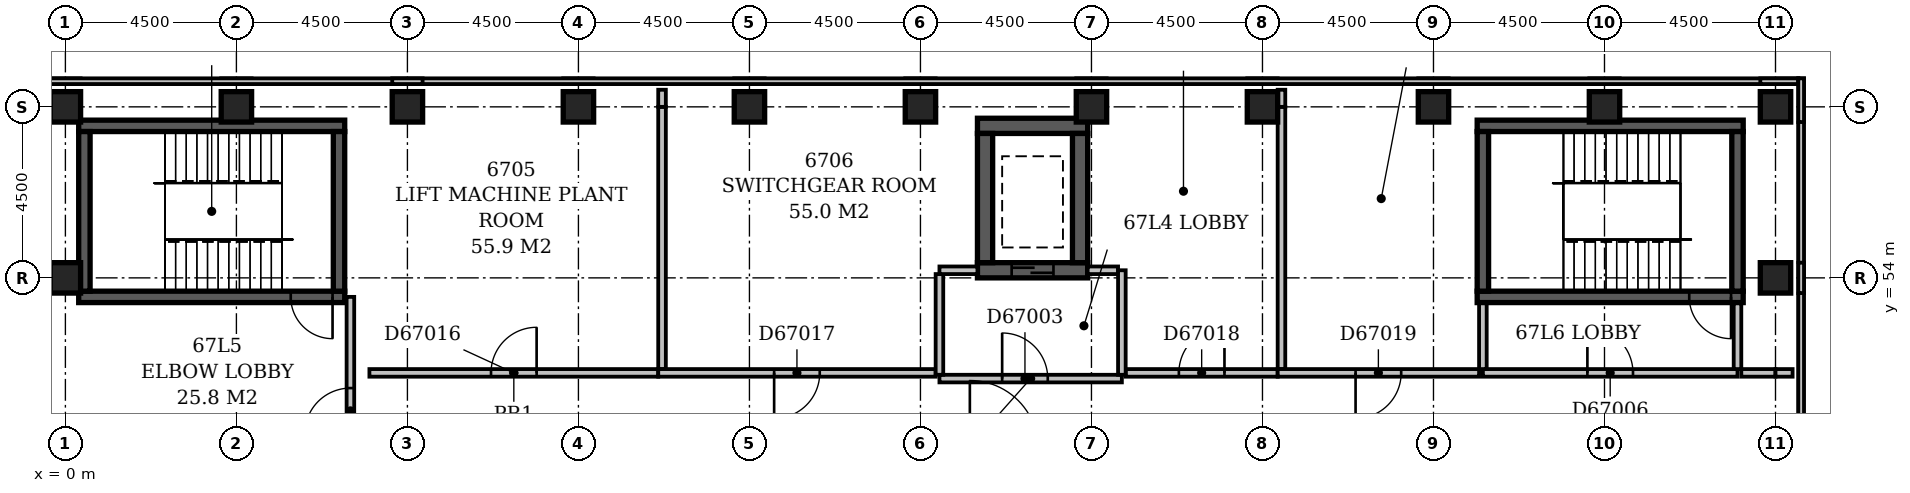
"""IFC4 building model, lengths in metres.
Left out: names, types, materials, properties, quantities, classifications, styles, units other than length and angle.
Written with IfcOpenShell. Run it as: python <this file> out.ifc"""

import sys

from ifc_helpers import new_model, si_unit, direction, frame, frame_2d, origin, origin_2d, place, context, subcontext, project, spatial, rectangle, extrude, element, fill, save


model = new_model("IFC4")
c1 = context("Model", 3, precision=1e-05, world=origin(), true_north=direction((0.0, 1.0)))
c2 = subcontext(c1, "Body", "Model", "MODEL_VIEW")
j1 = project(units=[si_unit("LENGTHUNIT", "METRE"), si_unit("PLANEANGLEUNIT", "RADIAN")], contexts=[c1])
p1 = place(None, origin())
s1 = spatial("IfcSite", under=j1, at=p1, CompositionType="ELEMENT")
p2 = place(p1, origin())
s2 = spatial("IfcBuilding", under=s1, at=p2, CompositionType="ELEMENT")
p3 = place(p2, frame((0.0, 0.0, 258.2)))
s3 = spatial("IfcBuildingStorey", under=s2, at=p3, CompositionType="ELEMENT", Elevation=258.2)
p4 = place(p3, frame((0.35, 53.5, -0.45), z_axis=(0.0, 0.0, 1.0), x_axis=(1.0, 0.0, 0.0)))
e1 = element("IfcWall", 1, at=p4, inside=s3, PredefinedType="SHEAR", context=c2, shape_type="SweptSolid", body=[
    extrude(rectangle(XDim=7.0, YDim=0.3, at=frame_2d((3.5, 0.0))), origin(), (0.0, 0.0, 1.0), 8.05),
])
p5 = place(p4, frame((5.58, 0.0, 0.45)))
e2 = element("IfcOpeningElement", 2, at=p5, cuts=e1, PredefinedType="OPENING", context=c2, shape_type="SweptSolid", body=[
    extrude(rectangle(XDim=1.1, YDim=2.1, at=frame_2d((0.55, 1.05))), frame((0.0, 0.162, 0.0), z_axis=(0.0, -1.0, 0.0), x_axis=(1.0, 0.0, 0.0)), (0.0, 0.0, 1.0), 0.324),
])
p6 = place(p3, frame((0.35, 58.0, -0.45), z_axis=(0.0, 0.0, 1.0), x_axis=(1.0, 0.0, 0.0)))
e3 = element("IfcWall", 3, at=p6, inside=s3, PredefinedType="SHEAR", context=c2, shape_type="SweptSolid", body=[
    extrude(rectangle(XDim=7.0, YDim=0.3, at=frame_2d((3.5, 0.0))), origin(), (0.0, 0.0, 1.0), 8.05),
])
for number, where, z_axis, x_axis in (
    (4, (0.5, 53.65, -0.45), (0.0, 0.0, 1.0), (0.0, 1.0, 0.0)),
    (5, (7.2, 53.65, -0.45), (0.0, 0.0, 1.0), (0.0, 1.0, 0.0)),
):
    element("IfcWall", number, at=place(p3, frame(where, z_axis=z_axis, x_axis=x_axis)), inside=s3, PredefinedType="SHEAR", context=c2, shape_type="SweptSolid", body=[
        extrude(rectangle(XDim=4.2, YDim=0.3, at=frame_2d((2.1, 0.0))), origin(), (0.0, 0.0, 1.0), 8.05),
    ])
p7 = place(p3, frame((24.0, 54.2, -0.45), z_axis=(0.0, 0.0, 1.0), x_axis=(1.0, 0.0, 0.0)))
e6 = element("IfcWall", 6, at=p7, inside=s3, PredefinedType="SHEAR", context=c2, shape_type="SweptSolid", body=[
    extrude(rectangle(XDim=2.9, YDim=0.4, at=frame_2d((1.45, 0.0))), origin(), (0.0, 0.0, 1.0), 8.05),
])
p8 = place(p7, frame((0.9, 0.0, 0.45)))
e7 = element("IfcOpeningElement", 7, at=p8, cuts=e6, PredefinedType="OPENING", context=c2, shape_type="SweptSolid", body=[
    extrude(rectangle(XDim=1.1, YDim=2.1, at=frame_2d((0.55, 1.05))), frame((0.0, 0.212, 0.0), z_axis=(0.0, -1.0, 0.0), x_axis=(1.0, 0.0, 0.0)), (0.0, 0.0, 1.0), 0.424),
])
p9 = place(p3, frame((24.0, 58.0, -0.45), z_axis=(0.0, 0.0, 1.0), x_axis=(1.0, 0.0, 0.0)))
e8 = element("IfcWall", 8, at=p9, inside=s3, PredefinedType="SHEAR", context=c2, shape_type="SweptSolid", body=[
    extrude(rectangle(XDim=2.9, YDim=0.4, at=frame_2d((1.45, 0.0))), origin(), (0.0, 0.0, 1.0), 8.05),
])
for number, where, z_axis, x_axis in (
    (9, (24.2, 54.4, -0.45), (0.0, 0.0, 1.0), (0.0, 1.0, 0.0)),
    (10, (26.7, 54.4, -0.45), (0.0, 0.0, 1.0), (0.0, 1.0, 0.0)),
):
    element("IfcWall", number, at=place(p3, frame(where, z_axis=z_axis, x_axis=x_axis)), inside=s3, PredefinedType="SHEAR", context=c2, shape_type="SweptSolid", body=[
        extrude(rectangle(XDim=3.4, YDim=0.4, at=frame_2d((1.7, 0.0))), origin(), (0.0, 0.0, 1.0), 8.05),
    ])
p10 = place(p3, frame((37.15, 53.5, -0.45), z_axis=(0.0, 0.0, 1.0), x_axis=(1.0, 0.0, 0.0)))
e11 = element("IfcWall", 11, at=p10, inside=s3, PredefinedType="SHEAR", context=c2, shape_type="SweptSolid", body=[
    extrude(rectangle(XDim=7.0, YDim=0.3, at=frame_2d((3.5, 0.0))), origin(), (0.0, 0.0, 1.0), 8.05),
])
p11 = place(p10, frame((5.58, 0.0, 0.45)))
e12 = element("IfcOpeningElement", 12, at=p11, cuts=e11, PredefinedType="OPENING", context=c2, shape_type="SweptSolid", body=[
    extrude(rectangle(XDim=1.1, YDim=2.1, at=frame_2d((0.55, 1.05))), frame((0.0, 0.162, 0.0), z_axis=(0.0, -1.0, 0.0), x_axis=(1.0, 0.0, 0.0)), (0.0, 0.0, 1.0), 0.324),
])
p12 = place(p3, frame((37.15, 58.0, -0.45), z_axis=(0.0, 0.0, 1.0), x_axis=(1.0, 0.0, 0.0)))
e13 = element("IfcWall", 13, at=p12, inside=s3, PredefinedType="SHEAR", context=c2, shape_type="SweptSolid", body=[
    extrude(rectangle(XDim=7.0, YDim=0.3, at=frame_2d((3.5, 0.0))), origin(), (0.0, 0.0, 1.0), 8.05),
])
for number, where, z_axis, x_axis in (
    (14, (37.3, 53.65, -0.45), (0.0, 0.0, 1.0), (0.0, 1.0, 0.0)),
    (15, (44.0, 53.65, -0.45), (0.0, 0.0, 1.0), (0.0, 1.0, 0.0)),
):
    element("IfcWall", number, at=place(p3, frame(where, z_axis=z_axis, x_axis=x_axis)), inside=s3, PredefinedType="SHEAR", context=c2, shape_type="SweptSolid", body=[
        extrude(rectangle(XDim=4.2, YDim=0.3, at=frame_2d((2.1, 0.0))), origin(), (0.0, 0.0, 1.0), 8.05),
    ])
for number, where, z_axis, x_axis in (
    (16, (0.0, 54.0, -0.45), (0.0, 0.0, 1.0), (1.0, 0.0, 0.0)),
    (17, (45.0, 54.0, -0.45), (0.0, 0.0, 1.0), (1.0, 0.0, 0.0)),
    (18, (0.0, 58.5, -0.45), (0.0, 0.0, 1.0), (1.0, 0.0, 0.0)),
    (19, (4.5, 58.5, -0.45), (0.0, 0.0, 1.0), (1.0, 0.0, 0.0)),
    (20, (9.0, 58.5, -0.45), (0.0, 0.0, 1.0), (1.0, 0.0, 0.0)),
    (21, (13.5, 58.5, -0.45), (0.0, 0.0, 1.0), (1.0, 0.0, 0.0)),
    (22, (18.0, 58.5, -0.45), (0.0, 0.0, 1.0), (1.0, 0.0, 0.0)),
    (23, (22.5, 58.5, -0.45), (0.0, 0.0, 1.0), (1.0, 0.0, 0.0)),
    (24, (27.0, 58.5, -0.45), (0.0, 0.0, 1.0), (1.0, 0.0, 0.0)),
    (25, (31.5, 58.5, -0.45), (0.0, 0.0, 1.0), (1.0, 0.0, 0.0)),
    (26, (36.0, 58.5, -0.45), (0.0, 0.0, 1.0), (1.0, 0.0, 0.0)),
    (27, (40.5, 58.5, -0.45), (0.0, 0.0, 1.0), (1.0, 0.0, 0.0)),
    (28, (45.0, 58.5, -0.45), (0.0, 0.0, 1.0), (1.0, 0.0, 0.0)),
):
    element("IfcColumn", number, at=place(p3, frame(where, z_axis=z_axis, x_axis=x_axis)), inside=s3, PredefinedType="COLUMN", context=c2, shape_type="SweptSolid", body=[
        extrude(rectangle(XDim=0.8, YDim=0.8, at=origin_2d()), origin(), (0.0, 0.0, 1.0), 8.05),
    ])
p13 = place(p3, frame((45.675, 39.9, 0.0), z_axis=(0.0, 0.0, 1.0), x_axis=(0.0, 1.0, 0.0)))
e29 = element("IfcWall", 29, at=p13, inside=s3, PredefinedType="STANDARD", context=c2, shape_type="SweptSolid", body=[
    extrude(rectangle(XDim=19.35, YDim=0.15, at=frame_2d((9.675, 0.0))), origin(), (0.0, 0.0, 1.0), 1.1),
])
p14 = place(p3, frame((45.6, 59.175, 0.0), z_axis=(0.0, 0.0, 1.0), x_axis=(-1.0, 0.0, 0.0)))
e30 = element("IfcWall", 30, at=p14, inside=s3, PredefinedType="STANDARD", context=c2, shape_type="SweptSolid", body=[
    extrude(rectangle(XDim=46.35, YDim=0.15, at=frame_2d((23.175, 0.0))), origin(), (0.0, 0.0, 1.0), 1.1),
])
p15 = place(p3, frame((45.675, 53.6, 1.1), z_axis=(0.0, 0.0, 1.0), x_axis=(0.0, 1.0, 0.0)))
e31 = element("IfcWall", 31, at=p15, inside=s3, PredefinedType="STANDARD", context=c2, shape_type="SweptSolid", body=[
    extrude(rectangle(XDim=0.8, YDim=0.15, at=frame_2d((0.4, 0.0))), origin(), (0.0, 0.0, 1.0), 6.0),
])
p16 = place(p3, frame((45.675, 58.1, 1.1), z_axis=(0.0, 0.0, 1.0), x_axis=(0.0, 1.0, 0.0)))
e32 = element("IfcWall", 32, at=p16, inside=s3, PredefinedType="STANDARD", context=c2, shape_type="SweptSolid", body=[
    extrude(rectangle(XDim=1.15, YDim=0.15, at=frame_2d((0.575, 0.0))), origin(), (0.0, 0.0, 1.0), 6.0),
])
p17 = place(p3, frame((45.6, 59.175, 1.1), z_axis=(0.0, 0.0, 1.0), x_axis=(-1.0, 0.0, 0.0)))
e33 = element("IfcWall", 33, at=p17, inside=s3, PredefinedType="STANDARD", context=c2, shape_type="SweptSolid", body=[
    extrude(rectangle(XDim=1.0, YDim=0.15, at=frame_2d((0.5, 0.0))), origin(), (0.0, 0.0, 1.0), 6.0),
])
for number, where, z_axis, x_axis in (
    (34, (40.9, 59.175, 1.1), (0.0, 0.0, 1.0), (-1.0, 0.0, 0.0)),
    (35, (36.4, 59.175, 1.1), (0.0, 0.0, 1.0), (-1.0, 0.0, 0.0)),
    (36, (31.9, 59.175, 1.1), (0.0, 0.0, 1.0), (-1.0, 0.0, 0.0)),
    (37, (27.4, 59.175, 1.1), (0.0, 0.0, 1.0), (-1.0, 0.0, 0.0)),
    (38, (22.9, 59.175, 1.1), (0.0, 0.0, 1.0), (-1.0, 0.0, 0.0)),
    (39, (18.4, 59.175, 1.1), (0.0, 0.0, 1.0), (-1.0, 0.0, 0.0)),
    (40, (13.9, 59.175, 1.1), (0.0, 0.0, 1.0), (-1.0, 0.0, 0.0)),
    (41, (9.4, 59.175, 1.1), (0.0, 0.0, 1.0), (-1.0, 0.0, 0.0)),
    (42, (4.9, 59.175, 1.1), (0.0, 0.0, 1.0), (-1.0, 0.0, 0.0)),
):
    element("IfcWall", number, at=place(p3, frame(where, z_axis=z_axis, x_axis=x_axis)), inside=s3, PredefinedType="STANDARD", context=c2, shape_type="SweptSolid", body=[
        extrude(rectangle(XDim=0.8, YDim=0.15, at=frame_2d((0.4, 0.0))), origin(), (0.0, 0.0, 1.0), 6.0),
    ])
p18 = place(p3, frame((0.4, 59.175, 1.1), z_axis=(0.0, 0.0, 1.0), x_axis=(-1.0, 0.0, 0.0)))
e43 = element("IfcWall", 43, at=p18, inside=s3, PredefinedType="STANDARD", context=c2, shape_type="SweptSolid", body=[
    extrude(rectangle(XDim=1.15, YDim=0.15, at=frame_2d((0.575, 0.0))), origin(), (0.0, 0.0, 1.0), 6.0),
])
p19 = place(p3, frame((23.0, 51.35, 0.0), z_axis=(0.0, 0.0, 1.0), x_axis=(1.0, 0.0, 0.0)))
e44 = element("IfcWall", 44, at=p19, inside=s3, PredefinedType="PARTITIONING", context=c2, shape_type="SweptSolid", body=[
    extrude(rectangle(XDim=4.8, YDim=0.2, at=frame_2d((2.4, 0.0))), origin(), (0.0, 0.0, 1.0), 7.6),
])
p20 = place(p19, frame((1.65, 0.0, 0.0)))
e45 = element("IfcOpeningElement", 45, at=p20, cuts=e44, PredefinedType="OPENING", context=c2, shape_type="SweptSolid", body=[
    extrude(rectangle(XDim=1.2, YDim=2.1, at=frame_2d((0.6, 1.05))), frame((0.0, 0.112, 0.0), z_axis=(0.0, -1.0, 0.0), x_axis=(1.0, 0.0, 0.0)), (0.0, 0.0, 1.0), 0.224),
])
p21 = place(p3, frame((27.8, 51.45, 0.0), z_axis=(0.0, 0.0, 1.0), x_axis=(0.0, 1.0, 0.0)))
e46 = element("IfcWall", 46, at=p21, inside=s3, PredefinedType="PARTITIONING", context=c2, shape_type="SweptSolid", body=[
    extrude(rectangle(XDim=2.75, YDim=0.2, at=frame_2d((1.375, 0.0))), origin(), (0.0, 0.0, 1.0), 7.6),
])
p22 = place(p3, frame((23.0, 54.2, 0.0), z_axis=(0.0, 0.0, 1.0), x_axis=(1.0, 0.0, 0.0)))
e47 = element("IfcWall", 47, at=p22, inside=s3, PredefinedType="PARTITIONING", context=c2, shape_type="SweptSolid", body=[
    extrude(rectangle(XDim=1.0, YDim=0.2, at=frame_2d((0.5, 0.0))), origin(), (0.0, 0.0, 1.0), 7.6),
])
p23 = place(p3, frame((26.9, 54.2, 0.0), z_axis=(0.0, 0.0, 1.0), x_axis=(1.0, 0.0, 0.0)))
e48 = element("IfcWall", 48, at=p23, inside=s3, PredefinedType="PARTITIONING", context=c2, shape_type="SweptSolid", body=[
    extrude(rectangle(XDim=0.8, YDim=0.2, at=frame_2d((0.4, 0.0))), origin(), (0.0, 0.0, 1.0), 7.6),
])
p24 = place(p3, frame((23.0, 51.45, 0.0), z_axis=(0.0, 0.0, 1.0), x_axis=(0.0, 1.0, 0.0)))
e49 = element("IfcWall", 49, at=p24, inside=s3, PredefinedType="PARTITIONING", context=c2, shape_type="SweptSolid", body=[
    extrude(rectangle(XDim=2.65, YDim=0.2, at=frame_2d((1.325, 0.0))), origin(), (0.0, 0.0, 1.0), 7.6),
])
p25 = place(p3, frame((7.5, 49.6, 0.0), z_axis=(0.0, 0.0, 1.0), x_axis=(0.0, 1.0, 0.0)))
e50 = element("IfcWall", 50, at=p25, inside=s3, PredefinedType="PARTITIONING", context=c2, shape_type="SweptSolid", body=[
    extrude(rectangle(XDim=3.9, YDim=0.2, at=frame_2d((1.95, 0.0))), origin(), (0.0, 0.0, 1.0), 7.6),
])
p26 = place(p25, frame((0.3, 0.0, 0.0)))
e51 = element("IfcOpeningElement", 51, at=p26, cuts=e50, PredefinedType="OPENING", context=c2, shape_type="SweptSolid", body=[
    extrude(rectangle(XDim=1.2, YDim=2.1, at=frame_2d((0.6, 1.05))), frame((0.0, 0.112, 0.0), z_axis=(0.0, -1.0, 0.0), x_axis=(1.0, 0.0, 0.0)), (0.0, 0.0, 1.0), 0.224),
])
p27 = place(p3, frame((37.3, 51.5, 0.0), z_axis=(0.0, 0.0, 1.0), x_axis=(1.0, 0.0, 0.0)))
e52 = element("IfcWall", 52, at=p27, inside=s3, PredefinedType="PARTITIONING", context=c2, shape_type="SweptSolid", body=[
    extrude(rectangle(XDim=6.7, YDim=0.2, at=frame_2d((3.35, 0.0))), origin(), (0.0, 0.0, 1.0), 7.6),
])
p28 = place(p27, frame((2.75, 0.0, 0.0)))
e53 = element("IfcOpeningElement", 53, at=p28, cuts=e52, PredefinedType="OPENING", context=c2, shape_type="SweptSolid", body=[
    extrude(rectangle(XDim=1.2, YDim=2.1, at=frame_2d((0.6, 1.05))), frame((0.0, 0.112, 0.0), z_axis=(0.0, -1.0, 0.0), x_axis=(1.0, 0.0, 0.0)), (0.0, 0.0, 1.0), 0.224),
])
for number, where, z_axis, x_axis in (
    (54, (44.0, 51.6, 0.0), (0.0, 0.0, 1.0), (0.0, 1.0, 0.0)),
    (55, (37.3, 51.6, 0.0), (0.0, 0.0, 1.0), (0.0, 1.0, 0.0)),
):
    element("IfcWall", number, at=place(p3, frame(where, z_axis=z_axis, x_axis=x_axis)), inside=s3, PredefinedType="PARTITIONING", context=c2, shape_type="SweptSolid", body=[
        extrude(rectangle(XDim=1.73, YDim=0.2, at=frame_2d((0.865, 0.0))), origin(), (0.0, 0.0, 1.0), 7.6),
    ])
p29 = place(p3, frame((15.6, 51.5, 0.0), z_axis=(0.0, 0.0, 1.0), x_axis=(-1.0, 0.0, 0.0)))
e56 = element("IfcWall", 56, at=p29, inside=s3, PredefinedType="PARTITIONING", context=c2, shape_type="SweptSolid", body=[
    extrude(rectangle(XDim=7.6, YDim=0.2, at=frame_2d((3.8, 0.0))), origin(), (0.0, 0.0, 1.0), 7.6),
])
p30 = place(p29, frame((3.2, 0.0, 0.0)))
e57 = element("IfcOpeningElement", 57, at=p30, cuts=e56, PredefinedType="OPENING", context=c2, shape_type="SweptSolid", body=[
    extrude(rectangle(XDim=1.2, YDim=2.1, at=frame_2d((0.6, 1.05))), frame((0.0, 0.112, 0.0), z_axis=(0.0, -1.0, 0.0), x_axis=(1.0, 0.0, 0.0)), (0.0, 0.0, 1.0), 0.224),
])
p31 = place(p3, frame((22.9, 51.5, 0.0), z_axis=(0.0, 0.0, 1.0), x_axis=(-1.0, 0.0, 0.0)))
e58 = element("IfcWall", 58, at=p31, inside=s3, PredefinedType="PARTITIONING", context=c2, shape_type="SweptSolid", body=[
    extrude(rectangle(XDim=7.3, YDim=0.2, at=frame_2d((3.65, 0.0))), origin(), (0.0, 0.0, 1.0), 7.6),
])
p32 = place(p31, frame((3.05, 0.0, 0.0)))
e59 = element("IfcOpeningElement", 59, at=p32, cuts=e58, PredefinedType="OPENING", context=c2, shape_type="SweptSolid", body=[
    extrude(rectangle(XDim=1.2, YDim=2.1, at=frame_2d((0.6, 1.05))), frame((0.0, 0.112, 0.0), z_axis=(0.0, -1.0, 0.0), x_axis=(1.0, 0.0, 0.0)), (0.0, 0.0, 1.0), 0.224),
])
p33 = place(p3, frame((31.9, 51.5, 0.0), z_axis=(0.0, 0.0, 1.0), x_axis=(-1.0, 0.0, 0.0)))
e60 = element("IfcWall", 60, at=p33, inside=s3, PredefinedType="PARTITIONING", context=c2, shape_type="SweptSolid", body=[
    extrude(rectangle(XDim=4.0, YDim=0.2, at=frame_2d((2.0, 0.0))), origin(), (0.0, 0.0, 1.0), 7.6),
])
p34 = place(p33, frame((1.4, 0.0, 0.0)))
e61 = element("IfcOpeningElement", 61, at=p34, cuts=e60, PredefinedType="OPENING", context=c2, shape_type="SweptSolid", body=[
    extrude(rectangle(XDim=1.2, YDim=2.1, at=frame_2d((0.6, 1.05))), frame((0.0, 0.112, 0.0), z_axis=(0.0, -1.0, 0.0), x_axis=(1.0, 0.0, 0.0)), (0.0, 0.0, 1.0), 0.224),
])
p35 = place(p3, frame((37.2, 51.5, 0.0), z_axis=(0.0, 0.0, 1.0), x_axis=(-1.0, 0.0, 0.0)))
e62 = element("IfcWall", 62, at=p35, inside=s3, PredefinedType="PARTITIONING", context=c2, shape_type="SweptSolid", body=[
    extrude(rectangle(XDim=5.3, YDim=0.2, at=frame_2d((2.65, 0.0))), origin(), (0.0, 0.0, 1.0), 7.6),
])
p36 = place(p35, frame((2.05, 0.0, 0.0)))
e63 = element("IfcOpeningElement", 63, at=p36, cuts=e62, PredefinedType="OPENING", context=c2, shape_type="SweptSolid", body=[
    extrude(rectangle(XDim=1.2, YDim=2.1, at=frame_2d((0.6, 1.05))), frame((0.0, 0.112, 0.0), z_axis=(0.0, -1.0, 0.0), x_axis=(1.0, 0.0, 0.0)), (0.0, 0.0, 1.0), 0.224),
])
p37 = place(p3, frame((45.0, 51.5, 0.0), z_axis=(0.0, 0.0, 1.0), x_axis=(-1.0, 0.0, 0.0)))
e64 = element("IfcWall", 64, at=p37, inside=s3, PredefinedType="PARTITIONING", context=c2, shape_type="SweptSolid", body=[
    extrude(rectangle(XDim=0.9, YDim=0.2, at=frame_2d((0.45, 0.0))), origin(), (0.0, 0.0, 1.0), 7.6),
])
p38 = place(p3, frame((45.45, 51.5, 0.0), z_axis=(0.0, 0.0, 1.0), x_axis=(-1.0, 0.0, 0.0)))
e65 = element("IfcWall", 65, at=p38, inside=s3, PredefinedType="PARTITIONING", context=c2, shape_type="SweptSolid", body=[
    extrude(rectangle(XDim=0.45, YDim=0.2, at=frame_2d((0.225, 0.0))), origin(), (0.0, 0.0, 1.0), 7.6),
])
for number, where, z_axis, x_axis in (
    (66, (15.7, 58.5, 0.0), (0.0, 0.0, 1.0), (0.0, -1.0, 0.0)),
    (67, (32.0, 58.5, 0.0), (0.0, 0.0, 1.0), (0.0, -1.0, 0.0)),
):
    element("IfcWall", number, at=place(p3, frame(where, z_axis=z_axis, x_axis=x_axis)), inside=s3, PredefinedType="PARTITIONING", context=c2, shape_type="SweptSolid", body=[
        extrude(rectangle(XDim=6.9, YDim=0.2, at=frame_2d((3.45, 0.0))), origin(), (0.0, 0.0, 1.0), 7.6),
    ])
for number, where, z_axis, x_axis in (
    (68, (15.7, 58.95, 0.0), (0.0, 0.0, 1.0), (0.0, -1.0, 0.0)),
    (69, (32.0, 58.95, 0.0), (0.0, 0.0, 1.0), (0.0, -1.0, 0.0)),
):
    element("IfcWall", number, at=place(p3, frame(where, z_axis=z_axis, x_axis=x_axis)), inside=s3, PredefinedType="PARTITIONING", context=c2, shape_type="SweptSolid", body=[
        extrude(rectangle(XDim=0.45, YDim=0.2, at=frame_2d((0.225, 0.0))), origin(), (0.0, 0.0, 1.0), 7.6),
    ])
p39 = place(p26, origin())
e70 = element("IfcDoor", 70, at=p39, inside=s3, OperationType="SINGLE_SWING_LEFT", PredefinedType="DOOR", context=c2, shape_type="SweptSolid", body=[
    extrude(rectangle(XDim=1.2, YDim=2.1, at=frame_2d((0.6, 1.05))), frame((0.0, 0.025, 0.0), z_axis=(0.0, -1.0, 0.0), x_axis=(1.0, 0.0, 0.0)), (0.0, 0.0, 1.0), 0.05),
])
fill(e51, e70)
p40 = place(p20, origin())
e71 = element("IfcDoor", 71, at=p40, inside=s3, OperationType="SINGLE_SWING_LEFT", PredefinedType="DOOR", context=c2, shape_type="SweptSolid", body=[
    extrude(rectangle(XDim=1.2, YDim=2.1, at=frame_2d((0.6, 1.05))), frame((0.0, 0.025, 0.0), z_axis=(0.0, -1.0, 0.0), x_axis=(1.0, 0.0, 0.0)), (0.0, 0.0, 1.0), 0.05),
])
fill(e45, e71)
p41 = place(p8, origin())
e72 = element("IfcDoor", 72, at=p41, inside=s3, OperationType="SLIDING_TO_LEFT", PredefinedType="DOOR", context=c2, shape_type="SweptSolid", body=[
    extrude(rectangle(XDim=1.1, YDim=2.1, at=frame_2d((0.55, 1.05))), frame((0.0, 0.025, 0.0), z_axis=(0.0, -1.0, 0.0), x_axis=(1.0, 0.0, 0.0)), (0.0, 0.0, 1.0), 0.05),
])
fill(e7, e72)
p42 = place(p28, origin())
e73 = element("IfcDoor", 73, at=p42, inside=s3, OperationType="SINGLE_SWING_LEFT", PredefinedType="DOOR", context=c2, shape_type="SweptSolid", body=[
    extrude(rectangle(XDim=1.2, YDim=2.1, at=frame_2d((0.6, 1.05))), frame((0.0, 0.025, 0.0), z_axis=(0.0, -1.0, 0.0), x_axis=(1.0, 0.0, 0.0)), (0.0, 0.0, 1.0), 0.05),
])
fill(e53, e73)
p43 = place(p11, origin())
e74 = element("IfcDoor", 74, at=p43, inside=s3, OperationType="SINGLE_SWING_RIGHT", PredefinedType="DOOR", context=c2, shape_type="SweptSolid", body=[
    extrude(rectangle(XDim=1.1, YDim=2.1, at=frame_2d((0.55, 1.05))), frame((0.0, 0.025, 0.0), z_axis=(0.0, -1.0, 0.0), x_axis=(1.0, 0.0, 0.0)), (0.0, 0.0, 1.0), 0.05),
])
fill(e12, e74)
p44 = place(p5, origin())
e75 = element("IfcDoor", 75, at=p44, inside=s3, OperationType="SINGLE_SWING_RIGHT", PredefinedType="DOOR", context=c2, shape_type="SweptSolid", body=[
    extrude(rectangle(XDim=1.1, YDim=2.1, at=frame_2d((0.55, 1.05))), frame((0.0, 0.025, 0.0), z_axis=(0.0, -1.0, 0.0), x_axis=(1.0, 0.0, 0.0)), (0.0, 0.0, 1.0), 0.05),
])
fill(e2, e75)
p45 = place(p30, frame((1.2, 0.0, 0.0), z_axis=(0.0, 0.0, 1.0), x_axis=(-1.0, 0.0, 0.0)))
e76 = element("IfcDoor", 76, at=p45, inside=s3, OperationType="SINGLE_SWING_RIGHT", PredefinedType="DOOR", context=c2, shape_type="SweptSolid", body=[
    extrude(rectangle(XDim=1.2, YDim=2.1, at=frame_2d((0.6, 1.05))), frame((0.0, 0.025, 0.0), z_axis=(0.0, -1.0, 0.0), x_axis=(1.0, 0.0, 0.0)), (0.0, 0.0, 1.0), 0.05),
])
fill(e57, e76)
p46 = place(p32, frame((1.2, 0.0, 0.0), z_axis=(0.0, 0.0, 1.0), x_axis=(-1.0, 0.0, 0.0)))
e77 = element("IfcDoor", 77, at=p46, inside=s3, OperationType="SINGLE_SWING_LEFT", PredefinedType="DOOR", context=c2, shape_type="SweptSolid", body=[
    extrude(rectangle(XDim=1.2, YDim=2.1, at=frame_2d((0.6, 1.05))), frame((0.0, 0.025, 0.0), z_axis=(0.0, -1.0, 0.0), x_axis=(1.0, 0.0, 0.0)), (0.0, 0.0, 1.0), 0.05),
])
fill(e59, e77)
p47 = place(p34, frame((1.2, 0.0, 0.0), z_axis=(0.0, 0.0, 1.0), x_axis=(-1.0, 0.0, 0.0)))
e78 = element("IfcDoor", 78, at=p47, inside=s3, OperationType="SINGLE_SWING_RIGHT", PredefinedType="DOOR", context=c2, shape_type="SweptSolid", body=[
    extrude(rectangle(XDim=1.2, YDim=2.1, at=frame_2d((0.6, 1.05))), frame((0.0, 0.025, 0.0), z_axis=(0.0, -1.0, 0.0), x_axis=(1.0, 0.0, 0.0)), (0.0, 0.0, 1.0), 0.05),
])
fill(e61, e78)
p48 = place(p36, frame((1.2, 0.0, 0.0), z_axis=(0.0, 0.0, 1.0), x_axis=(-1.0, 0.0, 0.0)))
e79 = element("IfcDoor", 79, at=p48, inside=s3, OperationType="SINGLE_SWING_LEFT", PredefinedType="DOOR", context=c2, shape_type="SweptSolid", body=[
    extrude(rectangle(XDim=1.2, YDim=2.1, at=frame_2d((0.6, 1.05))), frame((0.0, 0.025, 0.0), z_axis=(0.0, -1.0, 0.0), x_axis=(1.0, 0.0, 0.0)), (0.0, 0.0, 1.0), 0.05),
])
fill(e63, e79)
save(model, sys.argv[1])
